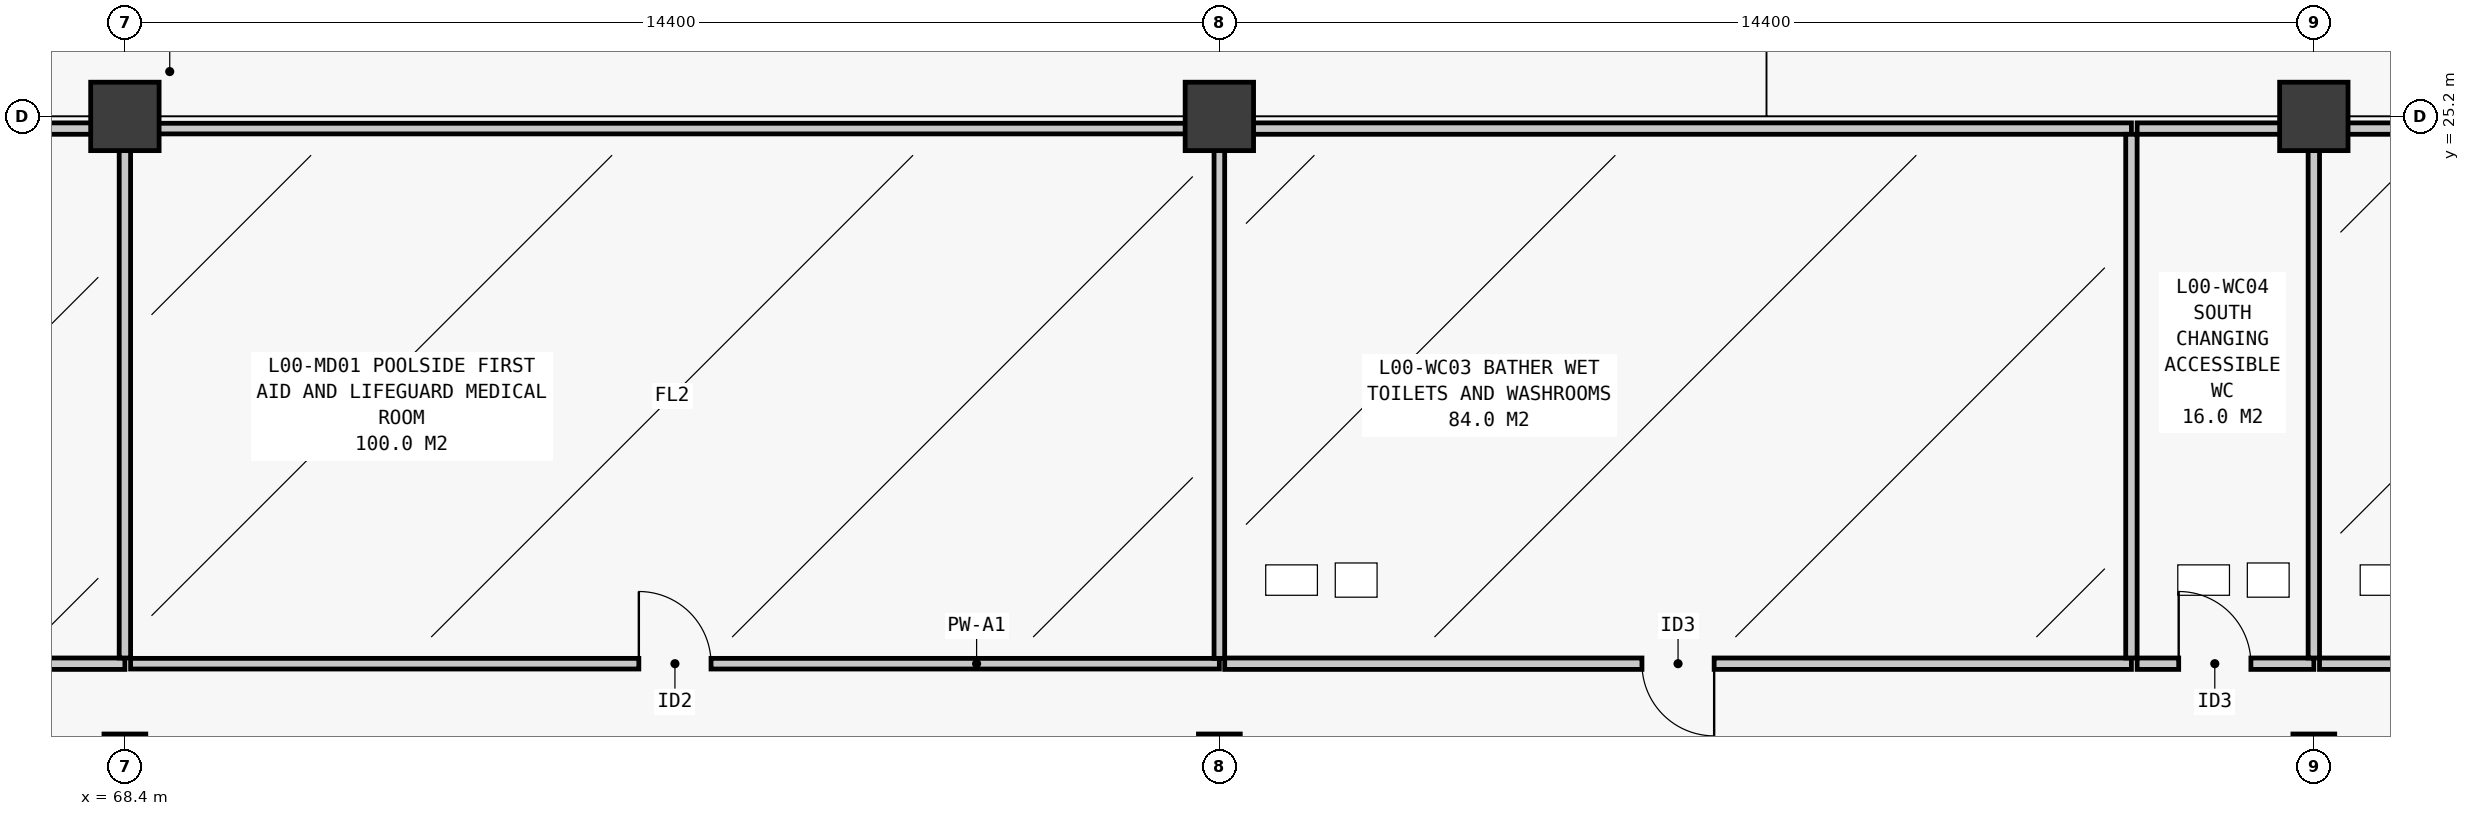
"""IFC4 building model, lengths in metres.
Left out: names, types, materials, properties, quantities, classifications, styles, units other than length and angle.
Written with IfcOpenShell. Run it as: python <this file> out.ifc"""

import sys

from ifc_helpers import new_model, si_unit, direction, frame, frame_2d, origin, origin_2d, place, context, subcontext, project, spatial, rectangle, extrude, element, fill, save


model = new_model("IFC4")
c1 = context("Model", 3, precision=1e-05, world=origin(), true_north=direction((0.0, 1.0)))
c2 = subcontext(c1, "Body", "Model", "MODEL_VIEW")
j1 = project(units=[si_unit("LENGTHUNIT", "METRE"), si_unit("PLANEANGLEUNIT", "RADIAN")], contexts=[c1])
p1 = place(None, origin())
s1 = spatial("IfcSite", under=j1, at=p1, CompositionType="ELEMENT")
p2 = place(p1, origin())
s2 = spatial("IfcBuilding", under=s1, at=p2, CompositionType="ELEMENT")
p3 = place(p2, origin())
s3 = spatial("IfcBuildingStorey", under=s2, at=p3, CompositionType="ELEMENT", Elevation=0.0)
p4 = place(p3, frame((68.4, 16.8, 0.0), z_axis=(0.0, 0.0, 1.0), x_axis=(1.0, 0.0, 0.0)))
e1 = element("IfcColumn", 1, at=p4, inside=s3, PredefinedType="COLUMN", context=c2, shape_type="SweptSolid", body=[
    extrude(rectangle(XDim=0.55, YDim=0.55, at=origin_2d()), origin(), (0.0, 0.0, 1.0), 4.8),
])
p5 = place(p3, frame((68.4, 25.2, 0.0), z_axis=(0.0, 0.0, 1.0), x_axis=(1.0, 0.0, 0.0)))
e2 = element("IfcColumn", 2, at=p5, inside=s3, PredefinedType="COLUMN", context=c2, shape_type="SweptSolid", body=[
    extrude(rectangle(XDim=0.9, YDim=0.9, at=origin_2d()), origin(), (0.0, 0.0, 1.0), 4.8),
])
p6 = place(p3, frame((82.8, 16.8, 0.0), z_axis=(0.0, 0.0, 1.0), x_axis=(1.0, 0.0, 0.0)))
e3 = element("IfcColumn", 3, at=p6, inside=s3, PredefinedType="COLUMN", context=c2, shape_type="SweptSolid", body=[
    extrude(rectangle(XDim=0.55, YDim=0.55, at=origin_2d()), origin(), (0.0, 0.0, 1.0), 4.8),
])
p7 = place(p3, frame((82.8, 25.2, 0.0), z_axis=(0.0, 0.0, 1.0), x_axis=(1.0, 0.0, 0.0)))
e4 = element("IfcColumn", 4, at=p7, inside=s3, PredefinedType="COLUMN", context=c2, shape_type="SweptSolid", body=[
    extrude(rectangle(XDim=0.9, YDim=0.9, at=origin_2d()), origin(), (0.0, 0.0, 1.0), 4.8),
])
p8 = place(p3, frame((97.2, 16.8, 0.0), z_axis=(0.0, 0.0, 1.0), x_axis=(1.0, 0.0, 0.0)))
e5 = element("IfcColumn", 5, at=p8, inside=s3, PredefinedType="COLUMN", context=c2, shape_type="SweptSolid", body=[
    extrude(rectangle(XDim=0.55, YDim=0.55, at=origin_2d()), origin(), (0.0, 0.0, 1.0), 4.8),
])
p9 = place(p3, frame((97.2, 25.2, 0.0), z_axis=(0.0, 0.0, 1.0), x_axis=(1.0, 0.0, 0.0)))
e6 = element("IfcColumn", 6, at=p9, inside=s3, PredefinedType="COLUMN", context=c2, shape_type="SweptSolid", body=[
    extrude(rectangle(XDim=0.9, YDim=0.9, at=origin_2d()), origin(), (0.0, 0.0, 1.0), 4.8),
])
p10 = place(p3, frame((56.275, 18.0, 0.0), z_axis=(0.0, 0.0, 1.0), x_axis=(1.0, 0.0, 0.0)))
e7 = element("IfcWall", 7, at=p10, inside=s3, PredefinedType="PLUMBINGWALL", context=c2, shape_type="SweptSolid", body=[
    extrude(rectangle(XDim=12.125, YDim=0.15, at=frame_2d((6.062, 0.0))), origin(), (0.0, 0.0, 1.0), 4.52),
])
p11 = place(p10, frame((5.552, 0.0, 0.0)))
e8 = element("IfcOpeningElement", 8, at=p11, cuts=e7, PredefinedType="OPENING", context=c2, shape_type="SweptSolid", body=[
    extrude(rectangle(XDim=1.02, YDim=2.15, at=frame_2d((0.51, 1.075))), frame((0.0, 0.09, 0.0), z_axis=(0.0, -1.0, 0.0), x_axis=(1.0, 0.0, 0.0)), (0.0, 0.0, 1.0), 0.18),
])
p12 = place(p3, frame((56.275, 25.04, 0.0), z_axis=(0.0, 0.0, 1.0), x_axis=(1.0, 0.0, 0.0)))
e9 = element("IfcWall", 9, at=p12, inside=s3, PredefinedType="PLUMBINGWALL", context=c2, shape_type="SweptSolid", body=[
    extrude(rectangle(XDim=12.125, YDim=0.15, at=frame_2d((6.062, 0.0))), origin(), (0.0, 0.0, 1.0), 3.833),
])
p13 = place(p3, frame((68.4, 18.075, 0.0), z_axis=(0.0, 0.0, 1.0), x_axis=(0.0, 1.0, 0.0)))
e10 = element("IfcWall", 10, at=p13, inside=s3, PredefinedType="PLUMBINGWALL", context=c2, shape_type="SweptSolid", body=[
    extrude(rectangle(XDim=6.89, YDim=0.15, at=frame_2d((3.445, 0.0))), origin(), (0.0, 0.0, 1.0), 3.976),
])
p14 = place(p3, frame((68.475, 18.0, 0.0), z_axis=(0.0, 0.0, 1.0), x_axis=(1.0, 0.0, 0.0)))
e11 = element("IfcWall", 11, at=p14, inside=s3, PredefinedType="PARTITIONING", context=c2, shape_type="SweptSolid", body=[
    extrude(rectangle(XDim=14.325, YDim=0.14, at=frame_2d((7.163, 0.0))), origin(), (0.0, 0.0, 1.0), 4.52),
])
p15 = place(p14, frame((6.687, 0.0, 0.0)))
e12 = element("IfcOpeningElement", 12, at=p15, cuts=e11, PredefinedType="OPENING", context=c2, shape_type="SweptSolid", body=[
    extrude(rectangle(XDim=0.95, YDim=2.15, at=frame_2d((0.475, 1.075))), frame((0.0, 0.085, 0.0), z_axis=(0.0, -1.0, 0.0), x_axis=(1.0, 0.0, 0.0)), (0.0, 0.0, 1.0), 0.17),
])
p16 = place(p3, frame((68.475, 25.04, 0.0), z_axis=(0.0, 0.0, 1.0), x_axis=(1.0, 0.0, 0.0)))
e13 = element("IfcWall", 13, at=p16, inside=s3, PredefinedType="PARTITIONING", context=c2, shape_type="SweptSolid", body=[
    extrude(rectangle(XDim=14.325, YDim=0.14, at=frame_2d((7.163, 0.0))), origin(), (0.0, 0.0, 1.0), 4.52),
])
p17 = place(p3, frame((82.8, 18.07, 0.0), z_axis=(0.0, 0.0, 1.0), x_axis=(0.0, 1.0, 0.0)))
e14 = element("IfcWall", 14, at=p17, inside=s3, PredefinedType="PARTITIONING", context=c2, shape_type="SweptSolid", body=[
    extrude(rectangle(XDim=6.9, YDim=0.14, at=frame_2d((3.45, 0.0))), origin(), (0.0, 0.0, 1.0), 3.976),
])
p18 = place(p3, frame((82.87, 18.0, 0.0), z_axis=(0.0, 0.0, 1.0), x_axis=(1.0, 0.0, 0.0)))
e15 = element("IfcWall", 15, at=p18, inside=s3, PredefinedType="PLUMBINGWALL", context=c2, shape_type="SweptSolid", body=[
    extrude(rectangle(XDim=11.93, YDim=0.15, at=frame_2d((5.965, 0.0))), origin(), (0.0, 0.0, 1.0), 4.52),
])
p19 = place(p18, frame((5.49, 0.0, 0.0)))
e16 = element("IfcOpeningElement", 16, at=p19, cuts=e15, PredefinedType="OPENING", context=c2, shape_type="SweptSolid", body=[
    extrude(rectangle(XDim=0.95, YDim=2.1, at=frame_2d((0.475, 1.05))), frame((0.0, 0.09, 0.0), z_axis=(0.0, -1.0, 0.0), x_axis=(1.0, 0.0, 0.0)), (0.0, 0.0, 1.0), 0.18),
])
p20 = place(p3, frame((82.87, 25.04, 0.0), z_axis=(0.0, 0.0, 1.0), x_axis=(1.0, 0.0, 0.0)))
e17 = element("IfcWall", 17, at=p20, inside=s3, PredefinedType="PLUMBINGWALL", context=c2, shape_type="SweptSolid", body=[
    extrude(rectangle(XDim=11.93, YDim=0.15, at=frame_2d((5.965, 0.0))), origin(), (0.0, 0.0, 1.0), 3.833),
])
p21 = place(p3, frame((94.8, 18.075, 0.0), z_axis=(0.0, 0.0, 1.0), x_axis=(0.0, 1.0, 0.0)))
e18 = element("IfcWall", 18, at=p21, inside=s3, PredefinedType="PLUMBINGWALL", context=c2, shape_type="SweptSolid", body=[
    extrude(rectangle(XDim=6.89, YDim=0.15, at=frame_2d((3.445, 0.0))), origin(), (0.0, 0.0, 1.0), 4.52),
])
p22 = place(p3, frame((94.875, 18.0, 0.0), z_axis=(0.0, 0.0, 1.0), x_axis=(1.0, 0.0, 0.0)))
e19 = element("IfcWall", 19, at=p22, inside=s3, PredefinedType="PLUMBINGWALL", context=c2, shape_type="SweptSolid", body=[
    extrude(rectangle(XDim=2.325, YDim=0.15, at=frame_2d((1.163, 0.0))), origin(), (0.0, 0.0, 1.0), 4.52),
])
p23 = place(p22, frame((0.547, 0.0, 0.0)))
e20 = element("IfcOpeningElement", 20, at=p23, cuts=e19, PredefinedType="OPENING", context=c2, shape_type="SweptSolid", body=[
    extrude(rectangle(XDim=0.95, YDim=2.1, at=frame_2d((0.475, 1.05))), frame((0.0, 0.09, 0.0), z_axis=(0.0, -1.0, 0.0), x_axis=(1.0, 0.0, 0.0)), (0.0, 0.0, 1.0), 0.18),
])
p24 = place(p3, frame((94.875, 25.04, 0.0), z_axis=(0.0, 0.0, 1.0), x_axis=(1.0, 0.0, 0.0)))
e21 = element("IfcWall", 21, at=p24, inside=s3, PredefinedType="PLUMBINGWALL", context=c2, shape_type="SweptSolid", body=[
    extrude(rectangle(XDim=2.325, YDim=0.15, at=frame_2d((1.163, 0.0))), origin(), (0.0, 0.0, 1.0), 3.833),
])
p25 = place(p3, frame((97.2, 18.075, 0.0), z_axis=(0.0, 0.0, 1.0), x_axis=(0.0, 1.0, 0.0)))
e22 = element("IfcWall", 22, at=p25, inside=s3, PredefinedType="PLUMBINGWALL", context=c2, shape_type="SweptSolid", body=[
    extrude(rectangle(XDim=6.89, YDim=0.15, at=frame_2d((3.445, 0.0))), origin(), (0.0, 0.0, 1.0), 3.976),
])
p26 = place(p3, frame((97.275, 18.0, 0.0), z_axis=(0.0, 0.0, 1.0), x_axis=(1.0, 0.0, 0.0)))
e23 = element("IfcWall", 23, at=p26, inside=s3, PredefinedType="PLUMBINGWALL", context=c2, shape_type="SweptSolid", body=[
    extrude(rectangle(XDim=28.565, YDim=0.15, at=frame_2d((14.283, 0.0))), origin(), (0.0, 0.0, 1.0), 4.52),
])
p27 = place(p26, frame((9.486, 0.0, 0.0)))
e24 = element("IfcOpeningElement", 24, at=p27, cuts=e23, PredefinedType="OPENING", context=c2, shape_type="SweptSolid", body=[
    extrude(rectangle(XDim=1.65, YDim=2.25, at=frame_2d((0.825, 1.125))), frame((0.0, 0.09, 0.0), z_axis=(0.0, -1.0, 0.0), x_axis=(1.0, 0.0, 0.0)), (0.0, 0.0, 1.0), 0.18),
])
p28 = place(p3, frame((97.275, 25.04, 0.0), z_axis=(0.0, 0.0, 1.0), x_axis=(1.0, 0.0, 0.0)))
e25 = element("IfcWall", 25, at=p28, inside=s3, PredefinedType="PLUMBINGWALL", context=c2, shape_type="SweptSolid", body=[
    extrude(rectangle(XDim=28.565, YDim=0.15, at=frame_2d((14.283, 0.0))), origin(), (0.0, 0.0, 1.0), 3.833),
])
p29 = place(p15, origin())
e26 = element("IfcDoor", 26, at=p29, inside=s3, OperationType="SINGLE_SWING_LEFT", PredefinedType="DOOR", context=c2, shape_type="SweptSolid", body=[
    extrude(rectangle(XDim=0.95, YDim=2.15, at=frame_2d((0.475, 1.075))), frame((0.0, 0.025, 0.0), z_axis=(0.0, -1.0, 0.0), x_axis=(1.0, 0.0, 0.0)), (0.0, 0.0, 1.0), 0.05),
])
fill(e12, e26)
p30 = place(p19, frame((0.95, 0.0, 0.0), z_axis=(0.0, 0.0, 1.0), x_axis=(-1.0, 0.0, 0.0)))
e27 = element("IfcDoor", 27, at=p30, inside=s3, OperationType="SINGLE_SWING_RIGHT", PredefinedType="DOOR", context=c2, shape_type="SweptSolid", body=[
    extrude(rectangle(XDim=0.95, YDim=2.1, at=frame_2d((0.475, 1.05))), frame((0.0, 0.025, 0.0), z_axis=(0.0, -1.0, 0.0), x_axis=(1.0, 0.0, 0.0)), (0.0, 0.0, 1.0), 0.05),
])
fill(e16, e27)
p31 = place(p23, origin())
e28 = element("IfcDoor", 28, at=p31, inside=s3, OperationType="SINGLE_SWING_LEFT", PredefinedType="DOOR", context=c2, shape_type="SweptSolid", body=[
    extrude(rectangle(XDim=0.95, YDim=2.1, at=frame_2d((0.475, 1.05))), frame((0.0, 0.025, 0.0), z_axis=(0.0, -1.0, 0.0), x_axis=(1.0, 0.0, 0.0)), (0.0, 0.0, 1.0), 0.05),
])
fill(e20, e28)
save(model, sys.argv[1])
